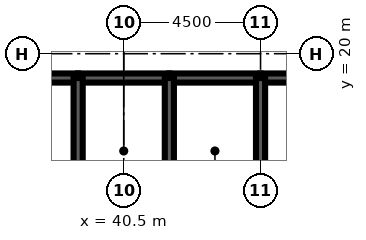
"""IFC4 building model, lengths in metres.
Left out: names, types, materials, properties, quantities, classifications, styles, units other than length and angle.
Written with IfcOpenShell. Run it as: python <this file> out.ifc"""

import sys

from ifc_helpers import new_model, si_unit, direction, frame, frame_2d, origin, place, context, subcontext, project, spatial, rectangle, extrude, element, fill, save


model = new_model("IFC4")
c1 = context("Model", 3, precision=1e-05, world=origin(), true_north=direction((0.0, 1.0)))
c2 = subcontext(c1, "Body", "Model", "MODEL_VIEW")
j1 = project(units=[si_unit("LENGTHUNIT", "METRE"), si_unit("PLANEANGLEUNIT", "RADIAN")], contexts=[c1])
p1 = place(None, origin())
s1 = spatial("IfcSite", under=j1, at=p1, CompositionType="ELEMENT")
p2 = place(p1, origin())
s2 = spatial("IfcBuilding", under=s1, at=p2, CompositionType="ELEMENT")
p3 = place(p2, frame((0.0, 0.0, 211.0)))
s3 = spatial("IfcBuildingStorey", under=s2, at=p3, CompositionType="ELEMENT", Elevation=211.0)
p4 = place(p3, frame((36.0, 19.2, 0.0), z_axis=(0.0, 0.0, 1.0), x_axis=(1.0, 0.0, 0.0)))
e1 = element("IfcWall", 1, at=p4, inside=s3, PredefinedType="SOLIDWALL", context=c2, shape_type="SweptSolid", body=[
    extrude(rectangle(XDim=3.0, YDim=0.3, at=frame_2d((1.5, 0.0))), origin(), (0.0, 0.0, 1.0), 4.2),
])
p5 = place(p4, frame((0.95, 0.0, 0.0)))
e2 = element("IfcOpeningElement", 2, at=p5, cuts=e1, PredefinedType="OPENING", context=c2, shape_type="SweptSolid", body=[
    extrude(rectangle(XDim=1.1, YDim=2.2, at=frame_2d((0.55, 1.1))), frame((0.0, 0.16, 0.0), z_axis=(0.0, -1.0, 0.0), x_axis=(1.0, 0.0, 0.0)), (0.0, 0.0, 1.0), 0.32),
])
p6 = place(p3, frame((39.0, 19.2, 0.0), z_axis=(0.0, 0.0, 1.0), x_axis=(1.0, 0.0, 0.0)))
e3 = element("IfcWall", 3, at=p6, inside=s3, PredefinedType="SOLIDWALL", context=c2, shape_type="SweptSolid", body=[
    extrude(rectangle(XDim=3.0, YDim=0.3, at=frame_2d((1.5, 0.0))), origin(), (0.0, 0.0, 1.0), 4.2),
])
p7 = place(p6, frame((1.0, 0.0, 0.0)))
e4 = element("IfcOpeningElement", 4, at=p7, cuts=e3, PredefinedType="OPENING", context=c2, shape_type="SweptSolid", body=[
    extrude(rectangle(XDim=1.0, YDim=2.1, at=frame_2d((0.5, 1.05))), frame((0.0, 0.16, 0.0), z_axis=(0.0, -1.0, 0.0), x_axis=(1.0, 0.0, 0.0)), (0.0, 0.0, 1.0), 0.32),
])
p8 = place(p3, frame((42.0, 19.2, 0.0), z_axis=(0.0, 0.0, 1.0), x_axis=(1.0, 0.0, 0.0)))
e5 = element("IfcWall", 5, at=p8, inside=s3, PredefinedType="SOLIDWALL", context=c2, shape_type="SweptSolid", body=[
    extrude(rectangle(XDim=3.0, YDim=0.3, at=frame_2d((1.5, 0.0))), origin(), (0.0, 0.0, 1.0), 4.2),
])
p9 = place(p8, frame((1.0, 0.0, 0.0)))
e6 = element("IfcOpeningElement", 6, at=p9, cuts=e5, PredefinedType="OPENING", context=c2, shape_type="SweptSolid", body=[
    extrude(rectangle(XDim=1.0, YDim=2.1, at=frame_2d((0.5, 1.05))), frame((0.0, 0.16, 0.0), z_axis=(0.0, -1.0, 0.0), x_axis=(1.0, 0.0, 0.0)), (0.0, 0.0, 1.0), 0.32),
])
p10 = place(p3, frame((45.0, 19.2, 0.0), z_axis=(0.0, 0.0, 1.0), x_axis=(1.0, 0.0, 0.0)))
e7 = element("IfcWall", 7, at=p10, inside=s3, PredefinedType="SOLIDWALL", context=c2, shape_type="SweptSolid", body=[
    extrude(rectangle(XDim=9.0, YDim=0.3, at=frame_2d((4.5, 0.0))), origin(), (0.0, 0.0, 1.0), 4.2),
])
p11 = place(p10, frame((7.35, 0.0, 0.0)))
e8 = element("IfcOpeningElement", 8, at=p11, cuts=e7, PredefinedType="OPENING", context=c2, shape_type="SweptSolid", body=[
    extrude(rectangle(XDim=1.0, YDim=2.1, at=frame_2d((0.5, 1.05))), frame((0.0, 0.16, 0.0), z_axis=(0.0, -1.0, 0.0), x_axis=(1.0, 0.0, 0.0)), (0.0, 0.0, 1.0), 0.32),
])
for number, where, z_axis, x_axis in (
    (9, (39.0, 16.0, 0.0), (0.0, 0.0, 1.0), (0.0, 1.0, 0.0)),
    (10, (42.0, 16.0, 0.0), (0.0, 0.0, 1.0), (0.0, 1.0, 0.0)),
    (11, (45.0, 16.0, 0.0), (0.0, 0.0, 1.0), (0.0, 1.0, 0.0)),
):
    element("IfcWall", number, at=place(p3, frame(where, z_axis=z_axis, x_axis=x_axis)), inside=s3, PredefinedType="SOLIDWALL", context=c2, shape_type="SweptSolid", body=[
        extrude(rectangle(XDim=3.2, YDim=0.3, at=frame_2d((1.6, 0.0))), origin(), (0.0, 0.0, 1.0), 4.2),
    ])
p12 = place(p3, frame((39.15, 17.35, 0.0), z_axis=(0.0, 0.0, 1.0), x_axis=(1.0, 0.0, 0.0)))
e12 = element("IfcWall", 12, at=p12, inside=s3, PredefinedType="SOLIDWALL", context=c2, shape_type="SweptSolid", body=[
    extrude(rectangle(XDim=2.7, YDim=0.3, at=frame_2d((1.35, 0.0))), origin(), (0.0, 0.0, 1.0), 4.04),
])
p13 = place(p12, frame((0.85, 0.0, 0.0)))
e13 = element("IfcOpeningElement", 13, at=p13, cuts=e12, PredefinedType="OPENING", context=c2, shape_type="SweptSolid", body=[
    extrude(rectangle(XDim=1.0, YDim=2.1, at=frame_2d((0.5, 1.05))), frame((0.0, 0.16, 0.0), z_axis=(0.0, -1.0, 0.0), x_axis=(1.0, 0.0, 0.0)), (0.0, 0.0, 1.0), 0.32),
])
p14 = place(p3, frame((42.15, 17.35, 0.0), z_axis=(0.0, 0.0, 1.0), x_axis=(1.0, 0.0, 0.0)))
e14 = element("IfcWall", 14, at=p14, inside=s3, PredefinedType="SOLIDWALL", context=c2, shape_type="SweptSolid", body=[
    extrude(rectangle(XDim=2.7, YDim=0.3, at=frame_2d((1.35, 0.0))), origin(), (0.0, 0.0, 1.0), 4.04),
])
p15 = place(p14, frame((0.85, 0.0, 0.0)))
e15 = element("IfcOpeningElement", 15, at=p15, cuts=e14, PredefinedType="OPENING", context=c2, shape_type="SweptSolid", body=[
    extrude(rectangle(XDim=1.0, YDim=2.1, at=frame_2d((0.5, 1.05))), frame((0.0, 0.16, 0.0), z_axis=(0.0, -1.0, 0.0), x_axis=(1.0, 0.0, 0.0)), (0.0, 0.0, 1.0), 0.32),
])
p16 = place(p13, origin())
e16 = element("IfcDoor", 16, at=p16, inside=s3, OperationType="SINGLE_SWING_LEFT", PredefinedType="DOOR", context=c2, shape_type="SweptSolid", body=[
    extrude(rectangle(XDim=1.0, YDim=2.1, at=frame_2d((0.5, 1.05))), frame((0.0, 0.025, 0.0), z_axis=(0.0, -1.0, 0.0), x_axis=(1.0, 0.0, 0.0)), (0.0, 0.0, 1.0), 0.05),
])
fill(e13, e16)
p17 = place(p15, origin())
e17 = element("IfcDoor", 17, at=p17, inside=s3, OperationType="SINGLE_SWING_LEFT", PredefinedType="DOOR", context=c2, shape_type="SweptSolid", body=[
    extrude(rectangle(XDim=1.0, YDim=2.1, at=frame_2d((0.5, 1.05))), frame((0.0, 0.025, 0.0), z_axis=(0.0, -1.0, 0.0), x_axis=(1.0, 0.0, 0.0)), (0.0, 0.0, 1.0), 0.05),
])
fill(e15, e17)
p18 = place(p7, origin())
e18 = element("IfcDoor", 18, at=p18, inside=s3, OperationType="SINGLE_SWING_LEFT", PredefinedType="DOOR", context=c2, shape_type="SweptSolid", body=[
    extrude(rectangle(XDim=1.0, YDim=2.1, at=frame_2d((0.5, 1.05))), frame((0.0, 0.025, 0.0), z_axis=(0.0, -1.0, 0.0), x_axis=(1.0, 0.0, 0.0)), (0.0, 0.0, 1.0), 0.05),
])
fill(e4, e18)
p19 = place(p9, origin())
e19 = element("IfcDoor", 19, at=p19, inside=s3, OperationType="SINGLE_SWING_LEFT", PredefinedType="DOOR", context=c2, shape_type="SweptSolid", body=[
    extrude(rectangle(XDim=1.0, YDim=2.1, at=frame_2d((0.5, 1.05))), frame((0.0, 0.025, 0.0), z_axis=(0.0, -1.0, 0.0), x_axis=(1.0, 0.0, 0.0)), (0.0, 0.0, 1.0), 0.05),
])
fill(e6, e19)
save(model, sys.argv[1])
